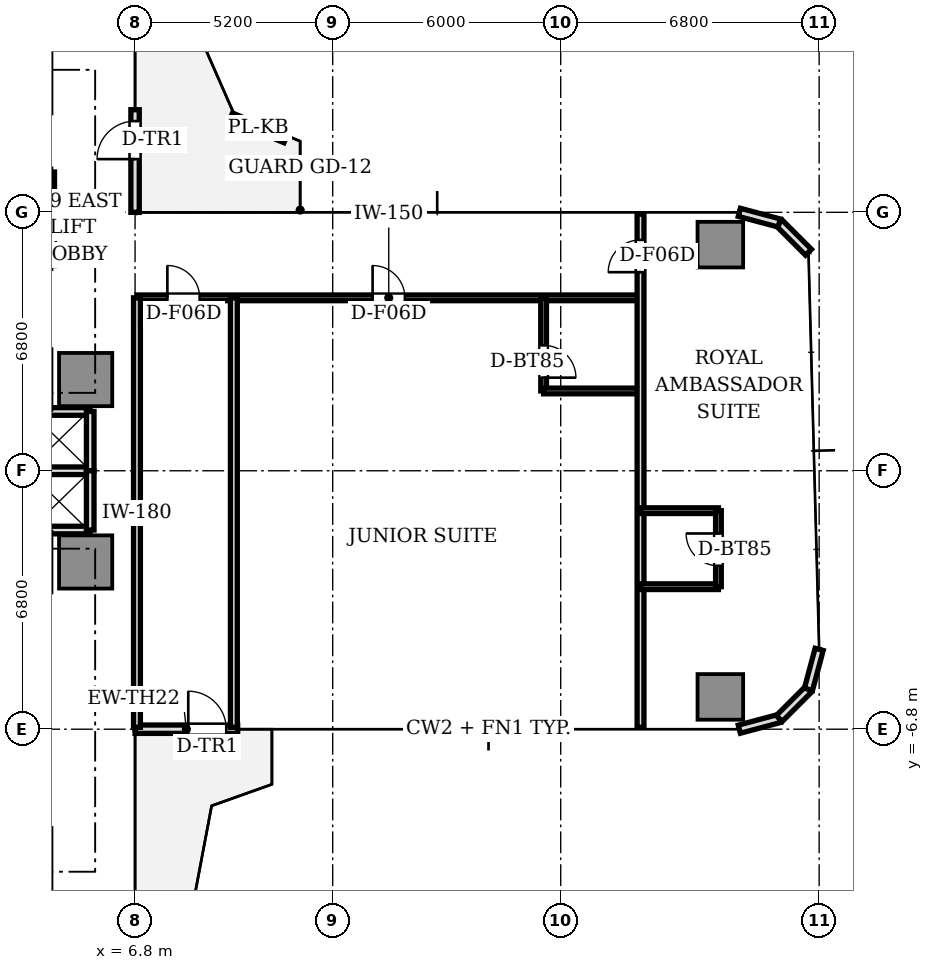
"""IFC4 building model, lengths in metres.
Left out: names, types, materials, properties, quantities, classifications, styles, units other than length and angle.
Written with IfcOpenShell. Run it as: python <this file> out.ifc"""

import sys

from ifc_helpers import new_model, si_unit, direction, frame, frame_2d, origin, origin_2d, place, context, subcontext, project, spatial, rectangle, extrude, source, transform, mapped, element, fill, save


model = new_model("IFC4")
c1 = context("Model", 3, precision=1e-05, world=origin(), true_north=direction((0.0, 1.0)))
c2 = subcontext(c1, "Body", "Model", "MODEL_VIEW")
j1 = project(units=[si_unit("LENGTHUNIT", "METRE"), si_unit("PLANEANGLEUNIT", "RADIAN")], contexts=[c1])
p1 = place(None, origin())
s1 = spatial("IfcSite", under=j1, at=p1, CompositionType="ELEMENT")
p2 = place(p1, origin())
s2 = spatial("IfcBuilding", under=s1, at=p2, CompositionType="ELEMENT")
p3 = place(p2, frame((0.0, 0.0, 36.5)))
s3 = spatial("IfcBuildingStorey", under=s2, at=p3, CompositionType="ELEMENT", Elevation=36.5)
m1 = source(origin(), c2, "Body", "SweptSolid", [
    extrude(rectangle(XDim=1.4, YDim=1.4, at=origin_2d()), origin(), (0.0, 0.0, 1.0), 3.11),
])
for number, where, z_axis, x_axis in (
    (1, (5.5, 2.4, 0.0), (0.0, 0.0, 1.0), (1.0, 0.0, 0.0)),
    (2, (5.5, -2.4, 0.0), (0.0, 0.0, 1.0), (1.0, 0.0, 0.0)),
):
    element("IfcColumn", number, at=place(p3, frame(where, z_axis=z_axis, x_axis=x_axis)), inside=s3, PredefinedType="COLUMN", context=c2, shape_type="MappedRepresentation", body=[
        mapped(m1, transform((0.0, 0.0, 0.0), scale=1.0)),
    ])
m2 = source(origin(), c2, "Body", "SweptSolid", [
    extrude(rectangle(XDim=1.2, YDim=1.2, at=origin_2d()), origin(), (0.0, 0.0, 1.0), 3.11),
])
for number, where, z_axis, x_axis in (
    (3, (22.2, -5.95, 0.0), (0.0, 0.0, 1.0), (1.0, 0.0, 0.0)),
    (4, (22.2, 5.95, 0.0), (0.0, 0.0, 1.0), (1.0, 0.0, 0.0)),
):
    element("IfcColumn", number, at=place(p3, frame(where, z_axis=z_axis, x_axis=x_axis)), inside=s3, PredefinedType="COLUMN", context=c2, shape_type="MappedRepresentation", body=[
        mapped(m2, transform((0.0, 0.0, 0.0), scale=1.0)),
    ])
p4 = place(p3, frame((6.8, -6.8, 0.0), z_axis=(0.0, 0.0, 1.0), x_axis=(1.0, 0.0, 0.0)))
e5 = element("IfcWall", 5, at=p4, inside=s3, PredefinedType="STANDARD", context=c2, shape_type="SweptSolid", body=[
    extrude(rectangle(XDim=2.7, YDim=0.22, at=frame_2d((1.35, 0.0))), origin(), (0.0, 0.0, 1.0), 3.11),
])
p5 = place(p4, frame((1.4, 0.0, 0.0)))
e6 = element("IfcOpeningElement", 6, at=p5, cuts=e5, PredefinedType="OPENING", context=c2, shape_type="SweptSolid", body=[
    extrude(rectangle(XDim=1.0, YDim=2.2, at=frame_2d((0.5, 1.1))), frame((0.0, 0.12, 0.0), z_axis=(0.0, -1.0, 0.0), x_axis=(1.0, 0.0, 0.0)), (0.0, 0.0, 1.0), 0.24),
])
for number, where, z_axis, x_axis in (
    (7, (22.7, -6.8, 0.0), (0.0, 0.0, 1.0), (0.966, 0.259, 0.0)),
    (8, (23.75, -6.519, 0.0), (0.0, 0.0, 1.0), (0.707, 0.707, 0.0)),
    (9, (24.519, -5.75, 0.0), (0.0, 0.0, 1.0), (0.259, 0.966, 0.0)),
    (10, (24.519, 5.75, 0.0), (0.0, 0.0, 1.0), (-0.707, 0.707, 0.0)),
    (11, (23.75, 6.519, 0.0), (0.0, 0.0, 1.0), (-0.966, 0.259, 0.0)),
):
    element("IfcWall", number, at=place(p3, frame(where, z_axis=z_axis, x_axis=x_axis)), inside=s3, PredefinedType="STANDARD", context=c2, shape_type="SweptSolid", body=[
        extrude(rectangle(XDim=1.087, YDim=0.22, at=frame_2d((0.543, 0.0))), origin(), (0.0, 0.0, 1.0), 3.11),
    ])
p6 = place(p3, frame((6.8, 6.8, 0.0), z_axis=(0.0, 0.0, 1.0), x_axis=(0.0, 1.0, 0.0)))
e12 = element("IfcWall", 12, at=p6, inside=s3, PredefinedType="STANDARD", context=c2, shape_type="SweptSolid", body=[
    extrude(rectangle(XDim=2.7, YDim=0.22, at=frame_2d((1.35, 0.0))), origin(), (0.0, 0.0, 1.0), 3.11),
])
p7 = place(p6, frame((1.4, 0.0, 0.0)))
e13 = element("IfcOpeningElement", 13, at=p7, cuts=e12, PredefinedType="OPENING", context=c2, shape_type="SweptSolid", body=[
    extrude(rectangle(XDim=1.0, YDim=2.2, at=frame_2d((0.5, 1.1))), frame((0.0, 0.12, 0.0), z_axis=(0.0, -1.0, 0.0), x_axis=(1.0, 0.0, 0.0)), (0.0, 0.0, 1.0), 0.24),
])
p8 = place(p3, frame((10.757, 8.724, 0.0), z_axis=(0.0, 0.0, 1.0), x_axis=(-0.922969728689, 0.384872550233, 0.0)))
e14 = element("IfcWall", 14, at=p8, inside=s3, PredefinedType="PARAPET", context=c2, shape_type="SweptSolid", body=[
    extrude(rectangle(XDim=1.55, YDim=0.2, at=frame_2d((0.775, 0.0))), origin(), (0.0, 0.0, 1.0), 0.65),
])
for number, where, z_axis, x_axis in (
    (15, (3.98, 1.56, 0.0), (0.0, 0.0, 1.0), (1.0, 0.0, 0.0)),
    (16, (3.98, -1.56, 0.0), (0.0, 0.0, 1.0), (1.0, 0.0, 0.0)),
    (17, (3.98, 0.0, 0.0), (0.0, 0.0, 1.0), (1.0, 0.0, 0.0)),
):
    element("IfcWall", number, at=place(p3, frame(where, z_axis=z_axis, x_axis=x_axis)), inside=s3, PredefinedType="SOLIDWALL", context=c2, shape_type="SweptSolid", body=[
        extrude(rectangle(XDim=1.64, YDim=0.2, at=frame_2d((0.82, 0.0))), origin(), (0.0, 0.0, 1.0), 2.66),
    ])
for number, where, z_axis, x_axis in (
    (18, (5.62, 0.0, 0.0), (0.0, 0.0, 1.0), (0.0, 1.0, 0.0)),
    (19, (5.62, -1.56, 0.0), (0.0, 0.0, 1.0), (0.0, 1.0, 0.0)),
):
    element("IfcWall", number, at=place(p3, frame(where, z_axis=z_axis, x_axis=x_axis)), inside=s3, PredefinedType="SOLIDWALL", context=c2, shape_type="SweptSolid", body=[
        extrude(rectangle(XDim=1.56, YDim=0.2, at=frame_2d((0.78, 0.0))), origin(), (0.0, 0.0, 1.0), 2.66),
    ])
p9 = place(p3, frame((4.58, 5.4, 0.0), z_axis=(0.0, 0.0, 1.0), x_axis=(0.0, 1.0, 0.0)))
e20 = element("IfcWall", 20, at=p9, inside=s3, PredefinedType="SOLIDWALL", context=c2, shape_type="SweptSolid", body=[
    extrude(rectangle(XDim=2.46, YDim=0.2, at=frame_2d((1.23, 0.0))), origin(), (0.0, 0.0, 1.0), 2.66),
])
p10 = place(p9, frame((0.55, 0.0, 0.0)))
e21 = element("IfcOpeningElement", 21, at=p10, cuts=e20, PredefinedType="OPENING", context=c2, shape_type="SweptSolid", body=[
    extrude(rectangle(XDim=0.85, YDim=2.1, at=frame_2d((0.425, 1.05))), frame((0.0, 0.11, 0.0), z_axis=(0.0, -1.0, 0.0), x_axis=(1.0, 0.0, 0.0)), (0.0, 0.0, 1.0), 0.22),
])
p11 = place(p3, frame((6.85, 4.55, 0.0), z_axis=(0.0, 0.0, 1.0), x_axis=(1.0, 0.0, 0.0)))
e22 = element("IfcWall", 22, at=p11, inside=s3, PredefinedType="PARTITIONING", context=c2, shape_type="SweptSolid", body=[
    extrude(rectangle(XDim=13.25, YDim=0.15, at=frame_2d((6.625, 0.0))), origin(), (0.0, 0.0, 1.0), 2.63),
])
p12 = place(p11, frame((0.8, 0.0, 0.0)))
e23 = element("IfcOpeningElement", 23, at=p12, cuts=e22, PredefinedType="OPENING", context=c2, shape_type="SweptSolid", body=[
    extrude(rectangle(XDim=0.85, YDim=2.1, at=frame_2d((0.425, 1.05))), frame((0.0, 0.085, 0.0), z_axis=(0.0, -1.0, 0.0), x_axis=(1.0, 0.0, 0.0)), (0.0, 0.0, 1.0), 0.17),
])
p13 = place(p11, frame((6.2, 0.0, 0.0)))
e24 = element("IfcOpeningElement", 24, at=p13, cuts=e22, PredefinedType="OPENING", context=c2, shape_type="SweptSolid", body=[
    extrude(rectangle(XDim=0.85, YDim=2.1, at=frame_2d((0.425, 1.05))), frame((0.0, 0.085, 0.0), z_axis=(0.0, -1.0, 0.0), x_axis=(1.0, 0.0, 0.0)), (0.0, 0.0, 1.0), 0.17),
])
for number, where, z_axis, x_axis in (
    (25, (6.85, -6.75, 0.0), (0.0, 0.0, 1.0), (0.0, 1.0, 0.0)),
    (26, (9.4, 4.55, 0.0), (0.0, 0.0, 1.0), (0.0, -1.0, 0.0)),
):
    element("IfcWall", number, at=place(p3, frame(where, z_axis=z_axis, x_axis=x_axis)), inside=s3, PredefinedType="PARTITIONING", context=c2, shape_type="SweptSolid", body=[
        extrude(rectangle(XDim=11.3, YDim=0.18, at=frame_2d((5.65, 0.0))), origin(), (0.0, 0.0, 1.0), 2.66),
    ])
p14 = place(p3, frame((17.55, 4.55, 0.0), z_axis=(0.0, 0.0, 1.0), x_axis=(0.0, -1.0, 0.0)))
e27 = element("IfcWall", 27, at=p14, inside=s3, PredefinedType="PARTITIONING", context=c2, shape_type="SweptSolid", body=[
    extrude(rectangle(XDim=2.45, YDim=0.15, at=frame_2d((1.225, 0.0))), origin(), (0.0, 0.0, 1.0), 2.66),
])
p15 = place(p14, frame((1.25, 0.0, 0.0)))
e28 = element("IfcOpeningElement", 28, at=p15, cuts=e27, PredefinedType="OPENING", context=c2, shape_type="SweptSolid", body=[
    extrude(rectangle(XDim=0.85, YDim=2.1, at=frame_2d((0.425, 1.05))), frame((0.0, 0.085, 0.0), z_axis=(0.0, -1.0, 0.0), x_axis=(1.0, 0.0, 0.0)), (0.0, 0.0, 1.0), 0.17),
])
p16 = place(p3, frame((17.55, 2.1, 0.0), z_axis=(0.0, 0.0, 1.0), x_axis=(1.0, 0.0, 0.0)))
e29 = element("IfcWall", 29, at=p16, inside=s3, PredefinedType="PARTITIONING", context=c2, shape_type="SweptSolid", body=[
    extrude(rectangle(XDim=2.55, YDim=0.15, at=frame_2d((1.275, 0.0))), origin(), (0.0, 0.0, 1.0), 2.66),
])
p17 = place(p3, frame((20.1, -6.75, 0.0), z_axis=(0.0, 0.0, 1.0), x_axis=(0.0, 1.0, 0.0)))
e30 = element("IfcWall", 30, at=p17, inside=s3, PredefinedType="PARTITIONING", context=c2, shape_type="SweptSolid", body=[
    extrude(rectangle(XDim=13.5, YDim=0.18, at=frame_2d((6.75, 0.0))), origin(), (0.0, 0.0, 1.0), 2.66),
])
p18 = place(p17, frame((11.975, 0.0, 0.0)))
e31 = element("IfcOpeningElement", 31, at=p18, cuts=e30, PredefinedType="OPENING", context=c2, shape_type="SweptSolid", body=[
    extrude(rectangle(XDim=0.85, YDim=2.1, at=frame_2d((0.425, 1.05))), frame((0.0, 0.1, 0.0), z_axis=(0.0, -1.0, 0.0), x_axis=(1.0, 0.0, 0.0)), (0.0, 0.0, 1.0), 0.2),
])
p19 = place(p3, frame((20.1, -1.05, 0.0), z_axis=(0.0, 0.0, 1.0), x_axis=(1.0, 0.0, 0.0)))
e32 = element("IfcWall", 32, at=p19, inside=s3, PredefinedType="PARTITIONING", context=c2, shape_type="SweptSolid", body=[
    extrude(rectangle(XDim=2.05, YDim=0.15, at=frame_2d((1.025, 0.0))), origin(), (0.0, 0.0, 1.0), 2.66),
])
p20 = place(p3, frame((20.1, -3.05, 0.0), z_axis=(0.0, 0.0, 1.0), x_axis=(1.0, 0.0, 0.0)))
e33 = element("IfcWall", 33, at=p20, inside=s3, PredefinedType="PARTITIONING", context=c2, shape_type="SweptSolid", body=[
    extrude(rectangle(XDim=2.05, YDim=0.15, at=frame_2d((1.025, 0.0))), origin(), (0.0, 0.0, 1.0), 2.63),
])
p21 = place(p3, frame((22.15, -3.05, 0.0), z_axis=(0.0, 0.0, 1.0), x_axis=(0.0, 1.0, 0.0)))
e34 = element("IfcWall", 34, at=p21, inside=s3, PredefinedType="PARTITIONING", context=c2, shape_type="SweptSolid", body=[
    extrude(rectangle(XDim=2.0, YDim=0.15, at=frame_2d((1.0, 0.0))), origin(), (0.0, 0.0, 1.0), 2.58),
])
p22 = place(p21, frame((0.55, 0.0, 0.0)))
e35 = element("IfcOpeningElement", 35, at=p22, cuts=e34, PredefinedType="OPENING", context=c2, shape_type="SweptSolid", body=[
    extrude(rectangle(XDim=0.85, YDim=2.1, at=frame_2d((0.425, 1.05))), frame((0.0, 0.085, 0.0), z_axis=(0.0, -1.0, 0.0), x_axis=(1.0, 0.0, 0.0)), (0.0, 0.0, 1.0), 0.17),
])
m3 = source(origin(), c2, "Body", "SweptSolid", [
    extrude(rectangle(XDim=1.0, YDim=0.05, at=origin_2d()), origin(), (0.0, 0.0, 1.0), 2.2),
])
p23 = place(p5, frame((0.5, 0.0, 0.0)))
e36 = element("IfcDoor", 36, at=p23, inside=s3, OperationType="SINGLE_SWING_LEFT", PredefinedType="DOOR", context=c2, shape_type="MappedRepresentation", body=[
    mapped(m3, transform((0.0, 0.0, 0.0), scale=1.0)),
])
fill(e6, e36)
p24 = place(p7, frame((0.5, 0.0, 0.0)))
e37 = element("IfcDoor", 37, at=p24, inside=s3, OperationType="SINGLE_SWING_LEFT", PredefinedType="DOOR", context=c2, shape_type="MappedRepresentation", body=[
    mapped(m3, transform((0.0, 0.0, 0.0), scale=1.0)),
])
fill(e13, e37)
m4 = source(origin(), c2, "Body", "SweptSolid", [
    extrude(rectangle(XDim=0.85, YDim=0.05, at=origin_2d()), origin(), (0.0, 0.0, 1.0), 2.1),
])
p25 = place(p12, frame((0.425, 0.0, 0.0)))
e38 = element("IfcDoor", 38, at=p25, inside=s3, OperationType="SINGLE_SWING_LEFT", PredefinedType="DOOR", context=c2, shape_type="MappedRepresentation", body=[
    mapped(m4, transform((0.0, 0.0, 0.0), scale=1.0)),
])
fill(e23, e38)
p26 = place(p15, frame((0.425, 0.0, 0.0)))
e39 = element("IfcDoor", 39, at=p26, inside=s3, OperationType="SINGLE_SWING_RIGHT", PredefinedType="DOOR", context=c2, shape_type="MappedRepresentation", body=[
    mapped(m4, transform((0.0, 0.0, 0.0), scale=1.0)),
])
fill(e28, e39)
p27 = place(p13, frame((0.425, 0.0, 0.0)))
e40 = element("IfcDoor", 40, at=p27, inside=s3, OperationType="SINGLE_SWING_LEFT", PredefinedType="DOOR", context=c2, shape_type="MappedRepresentation", body=[
    mapped(m4, transform((0.0, 0.0, 0.0), scale=1.0)),
])
fill(e24, e40)
p28 = place(p22, frame((0.425, 0.0, 0.0)))
e41 = element("IfcDoor", 41, at=p28, inside=s3, OperationType="SINGLE_SWING_RIGHT", PredefinedType="DOOR", context=c2, shape_type="MappedRepresentation", body=[
    mapped(m4, transform((0.0, 0.0, 0.0), scale=1.0)),
])
fill(e35, e41)
p29 = place(p18, frame((0.425, 0.0, 0.0)))
e42 = element("IfcDoor", 42, at=p29, inside=s3, OperationType="SINGLE_SWING_LEFT", PredefinedType="DOOR", context=c2, shape_type="MappedRepresentation", body=[
    mapped(m4, transform((0.0, 0.0, 0.0), scale=1.0)),
])
fill(e31, e42)
save(model, sys.argv[1])
